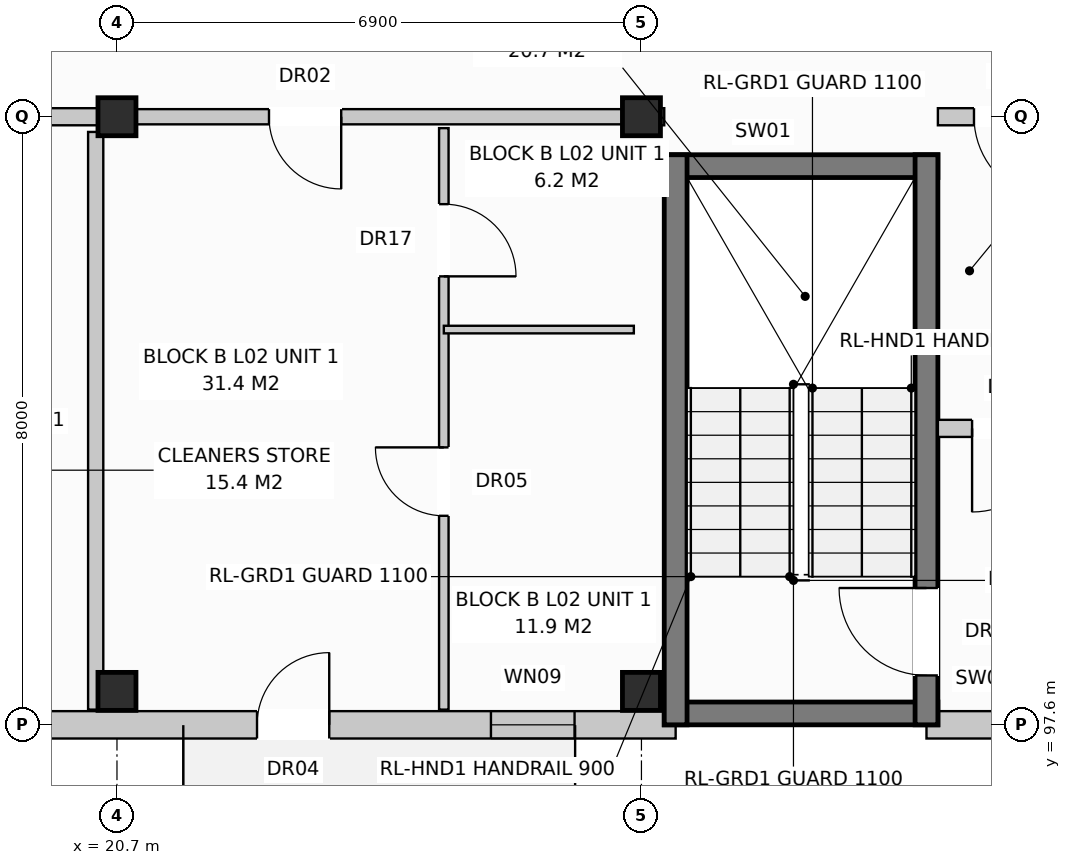
"""IFC4 building model, lengths in metres.
Left out: names, types, materials, properties, quantities, classifications, styles, units other than length and angle.
Written with IfcOpenShell. Run it as: python <this file> out.ifc"""

import sys

from ifc_helpers import new_model, si_unit, direction, frame, frame_2d, origin, origin_with_axes, origin_2d, place, context, subcontext, project, spatial, rectangle, extrude, element, fill, save


model = new_model("IFC4")
c1 = context("Model", 3, precision=1e-05, world=origin(), true_north=direction((0.0, 1.0)))
c2 = subcontext(c1, "Body", "Model", "MODEL_VIEW")
j1 = project(units=[si_unit("LENGTHUNIT", "METRE"), si_unit("PLANEANGLEUNIT", "RADIAN")], contexts=[c1])
p1 = place(None, origin())
s1 = spatial("IfcSite", under=j1, at=p1, CompositionType="ELEMENT")
p2 = place(p1, origin())
s2 = spatial("IfcBuilding", under=s1, at=p2, CompositionType="ELEMENT")
p3 = place(p2, frame((0.0, 0.0, 8.0)))
s3 = spatial("IfcBuildingStorey", under=s2, at=p3, CompositionType="ELEMENT", Elevation=8.0)
for number, where, z_axis, x_axis in (
    (1, (20.7, 98.04, 0.0), (0.0, 0.0, 1.0), (1.0, 0.0, 0.0)),
    (2, (20.7, 105.6, 0.0), (0.0, 0.0, 1.0), (1.0, 0.0, 0.0)),
    (3, (27.6, 98.04, 0.0), (0.0, 0.0, 1.0), (1.0, 0.0, 0.0)),
    (4, (27.6, 105.6, 0.0), (0.0, 0.0, 1.0), (1.0, 0.0, 0.0)),
):
    element("IfcColumn", number, at=place(p3, frame(where, z_axis=z_axis, x_axis=x_axis)), inside=s3, PredefinedType="COLUMN", context=c2, shape_type="SweptSolid", body=[
        extrude(rectangle(XDim=0.5, YDim=0.5, at=origin_2d()), origin(), (0.0, 0.0, 1.0), 3.2),
    ])
p4 = place(p3, frame((10.65, 97.6, 0.0), z_axis=(0.0, 0.0, 1.0), x_axis=(1.0, 0.0, 0.0)))
e5 = element("IfcWall", 5, at=p4, inside=s3, PredefinedType="STANDARD", context=c2, shape_type="SweptSolid", body=[
    extrude(rectangle(XDim=17.4, YDim=0.36, at=frame_2d((8.7, 0.0))), origin(), (0.0, 0.0, 1.0), 2.94),
])
p5 = place(p4, frame((11.893, 0.0, 0.0)))
e6 = element("IfcOpeningElement", 6, at=p5, cuts=e5, PredefinedType="OPENING", context=c2, shape_type="SweptSolid", body=[
    extrude(rectangle(XDim=0.95, YDim=2.1, at=frame_2d((0.475, 1.05))), frame((0.0, 0.192, 0.0), z_axis=(0.0, -1.0, 0.0), x_axis=(1.0, 0.0, 0.0)), (0.0, 0.0, 1.0), 0.384),
])
p6 = place(p4, frame((14.97, 0.0, 0.72)))
e7 = element("IfcOpeningElement", 7, at=p6, cuts=e5, PredefinedType="OPENING", context=c2, shape_type="SweptSolid", body=[
    extrude(rectangle(XDim=1.1, YDim=1.5, at=frame_2d((0.55, 0.75))), frame((0.0, 0.192, 0.0), z_axis=(0.0, -1.0, 0.0), x_axis=(1.0, 0.0, 0.0)), (0.0, 0.0, 1.0), 0.384),
])
p7 = place(p3, frame((31.35, 97.6, 0.0), z_axis=(0.0, 0.0, 1.0), x_axis=(1.0, 0.0, 0.0)))
e8 = element("IfcWall", 8, at=p7, inside=s3, PredefinedType="STANDARD", context=c2, shape_type="SweptSolid", body=[
    extrude(rectangle(XDim=23.68, YDim=0.36, at=frame_2d((11.84, 0.0))), origin(), (0.0, 0.0, 1.0), 2.94),
])
p8 = place(p7, frame((15.32, 0.0, 0.0)))
e9 = element("IfcOpeningElement", 9, at=p8, cuts=e8, PredefinedType="OPENING", context=c2, shape_type="SweptSolid", body=[
    extrude(rectangle(XDim=0.95, YDim=2.1, at=frame_2d((0.475, 1.05))), frame((0.0, 0.192, 0.0), z_axis=(0.0, -1.0, 0.0), x_axis=(1.0, 0.0, 0.0)), (0.0, 0.0, 1.0), 0.384),
])
p9 = place(p7, frame((11.67, 0.0, 0.72)))
e10 = element("IfcOpeningElement", 10, at=p9, cuts=e8, PredefinedType="OPENING", context=c2, shape_type="SweptSolid", body=[
    extrude(rectangle(XDim=1.1, YDim=1.5, at=frame_2d((0.55, 0.75))), frame((0.0, 0.192, 0.0), z_axis=(0.0, -1.0, 0.0), x_axis=(1.0, 0.0, 0.0)), (0.0, 0.0, 1.0), 0.384),
])
p10 = place(p7, frame((17.52, 0.0, 0.9)))
e11 = element("IfcOpeningElement", 11, at=p10, cuts=e8, PredefinedType="OPENING", context=c2, shape_type="SweptSolid", body=[
    extrude(rectangle(XDim=0.95, YDim=1.55, at=frame_2d((0.475, 0.775))), frame((0.0, 0.192, 0.0), z_axis=(0.0, -1.0, 0.0), x_axis=(1.0, 0.0, 0.0)), (0.0, 0.0, 1.0), 0.384),
])
p11 = place(p7, frame((20.67, 0.0, 0.72)))
e12 = element("IfcOpeningElement", 12, at=p11, cuts=e8, PredefinedType="OPENING", context=c2, shape_type="SweptSolid", body=[
    extrude(rectangle(XDim=1.1, YDim=1.5, at=frame_2d((0.55, 0.75))), frame((0.0, 0.192, 0.0), z_axis=(0.0, -1.0, 0.0), x_axis=(1.0, 0.0, 0.0)), (0.0, 0.0, 1.0), 0.384),
])
p12 = place(p3, frame((20.42, 97.8, 0.0), z_axis=(0.0, 0.0, 1.0), x_axis=(0.0, 1.0, 0.0)))
e13 = element("IfcWall", 13, at=p12, inside=s3, PredefinedType="PARTITIONING", context=c2, shape_type="SweptSolid", body=[
    extrude(rectangle(XDim=7.6, YDim=0.2, at=frame_2d((3.8, 0.0))), origin(), (0.0, 0.0, 1.0), 2.94),
])
p13 = place(p3, frame((10.8, 105.6, 0.0), z_axis=(0.0, 0.0, 1.0), x_axis=(1.0, 0.0, 0.0)))
e14 = element("IfcWall", 14, at=p13, inside=s3, PredefinedType="PARTITIONING", context=c2, shape_type="SweptSolid", body=[
    extrude(rectangle(XDim=9.9, YDim=0.225, at=frame_2d((4.95, 0.0))), origin(), (0.0, 0.0, 1.0), 2.38),
])
p14 = place(p13, frame((0.475, 0.0, 0.0)))
e15 = element("IfcOpeningElement", 15, at=p14, cuts=e14, PredefinedType="OPENING", context=c2, shape_type="SweptSolid", body=[
    extrude(rectangle(XDim=1.1, YDim=2.15, at=frame_2d((0.55, 1.075))), frame((0.0, 0.125, 0.0), z_axis=(0.0, -1.0, 0.0), x_axis=(1.0, 0.0, 0.0)), (0.0, 0.0, 1.0), 0.249),
])
p15 = place(p13, frame((5.75, 0.0, 0.0)))
e16 = element("IfcOpeningElement", 16, at=p15, cuts=e14, PredefinedType="OPENING", context=c2, shape_type="SweptSolid", body=[
    extrude(rectangle(XDim=0.9, YDim=2.1, at=frame_2d((0.45, 1.05))), frame((0.0, 0.125, 0.0), z_axis=(0.0, -1.0, 0.0), x_axis=(1.0, 0.0, 0.0)), (0.0, 0.0, 1.0), 0.249),
])
p16 = place(p13, frame((7.8, 0.0, 0.0)))
e17 = element("IfcOpeningElement", 17, at=p16, cuts=e14, PredefinedType="OPENING", context=c2, shape_type="SweptSolid", body=[
    extrude(rectangle(XDim=0.95, YDim=2.15, at=frame_2d((0.475, 1.075))), frame((0.0, 0.125, 0.0), z_axis=(0.0, -1.0, 0.0), x_axis=(1.0, 0.0, 0.0)), (0.0, 0.0, 1.0), 0.249),
])
for number, where, z_axis, x_axis in (
    (18, (27.9, 97.75, 0.0), (0.0, 0.0, 1.0), (1.0, 0.0, 0.0)),
    (19, (27.9, 104.95, 0.0), (0.0, 0.0, 1.0), (1.0, 0.0, 0.0)),
):
    element("IfcWall", number, at=place(p3, frame(where, z_axis=z_axis, x_axis=x_axis)), inside=s3, PredefinedType="SHEAR", context=c2, shape_type="SweptSolid", body=[
        extrude(rectangle(XDim=3.6, YDim=0.3, at=frame_2d((1.8, 0.0))), origin(), (0.0, 0.0, 1.0), 2.94),
    ])
p17 = place(p3, frame((28.05, 97.6, 0.0), z_axis=(0.0, 0.0, 1.0), x_axis=(0.0, 1.0, 0.0)))
e20 = element("IfcWall", 20, at=p17, inside=s3, PredefinedType="SHEAR", context=c2, shape_type="SweptSolid", body=[
    extrude(rectangle(XDim=7.5, YDim=0.3, at=frame_2d((3.75, 0.0))), origin(), (0.0, 0.0, 1.0), 2.94),
])
p18 = place(p3, frame((31.35, 97.6, 0.0), z_axis=(0.0, 0.0, 1.0), x_axis=(0.0, 1.0, 0.0)))
e21 = element("IfcWall", 21, at=p18, inside=s3, PredefinedType="SHEAR", context=c2, shape_type="SweptSolid", body=[
    extrude(rectangle(XDim=7.5, YDim=0.3, at=frame_2d((3.75, 0.0))), origin(), (0.0, 0.0, 1.0), 2.94),
])
p19 = place(p18, frame((0.65, 0.0, 0.0)))
e22 = element("IfcOpeningElement", 22, at=p19, cuts=e21, PredefinedType="OPENING", context=c2, shape_type="SweptSolid", body=[
    extrude(rectangle(XDim=1.15, YDim=2.15, at=frame_2d((0.575, 1.075))), frame((0.0, 0.162, 0.0), z_axis=(0.0, -1.0, 0.0), x_axis=(1.0, 0.0, 0.0)), (0.0, 0.0, 1.0), 0.324),
])
p20 = place(p3, frame((31.5, 101.5, 0.0), z_axis=(0.0, 0.0, 1.0), x_axis=(1.0, 0.0, 0.0)))
e23 = element("IfcWall", 23, at=p20, inside=s3, PredefinedType="PARTITIONING", context=c2, shape_type="SweptSolid", body=[
    extrude(rectangle(XDim=2.2, YDim=0.225, at=frame_2d((1.1, 0.0))), origin(), (0.0, 0.0, 1.0), 2.94),
])
p21 = place(p20, frame((0.45, 0.0, 0.0)))
e24 = element("IfcOpeningElement", 24, at=p21, cuts=e23, PredefinedType="OPENING", context=c2, shape_type="SweptSolid", body=[
    extrude(rectangle(XDim=1.1, YDim=2.15, at=frame_2d((0.55, 1.075))), frame((0.0, 0.125, 0.0), z_axis=(0.0, -1.0, 0.0), x_axis=(1.0, 0.0, 0.0)), (0.0, 0.0, 1.0), 0.249),
])
p22 = place(p3, frame((27.6, 105.6, 0.0), z_axis=(0.0, 0.0, 1.0), x_axis=(1.0, 0.0, 0.0)))
e25 = element("IfcWall", 25, at=p22, inside=s3, PredefinedType="PARTITIONING", context=c2, shape_type="SweptSolid", body=[
    extrude(rectangle(XDim=0.3, YDim=0.225, at=frame_2d((0.15, 0.0))), origin(), (0.0, 0.0, 1.0), 2.94),
])
p23 = place(p3, frame((31.5, 105.6, 0.0), z_axis=(0.0, 0.0, 1.0), x_axis=(1.0, 0.0, 0.0)))
e26 = element("IfcWall", 26, at=p23, inside=s3, PredefinedType="PARTITIONING", context=c2, shape_type="SweptSolid", body=[
    extrude(rectangle(XDim=9.9, YDim=0.225, at=frame_2d((4.95, 0.0))), origin(), (0.0, 0.0, 1.0), 2.38),
])
p24 = place(p23, frame((0.475, 0.0, 0.0)))
e27 = element("IfcOpeningElement", 27, at=p24, cuts=e26, PredefinedType="OPENING", context=c2, shape_type="SweptSolid", body=[
    extrude(rectangle(XDim=1.1, YDim=2.15, at=frame_2d((0.55, 1.075))), frame((0.0, 0.125, 0.0), z_axis=(0.0, -1.0, 0.0), x_axis=(1.0, 0.0, 0.0)), (0.0, 0.0, 1.0), 0.249),
])
p25 = place(p23, frame((5.75, 0.0, 0.0)))
e28 = element("IfcOpeningElement", 28, at=p25, cuts=e26, PredefinedType="OPENING", context=c2, shape_type="SweptSolid", body=[
    extrude(rectangle(XDim=0.9, YDim=2.1, at=frame_2d((0.45, 1.05))), frame((0.0, 0.125, 0.0), z_axis=(0.0, -1.0, 0.0), x_axis=(1.0, 0.0, 0.0)), (0.0, 0.0, 1.0), 0.249),
])
p26 = place(p23, frame((7.8, 0.0, 0.0)))
e29 = element("IfcOpeningElement", 29, at=p26, cuts=e26, PredefinedType="OPENING", context=c2, shape_type="SweptSolid", body=[
    extrude(rectangle(XDim=0.95, YDim=2.15, at=frame_2d((0.475, 1.075))), frame((0.0, 0.125, 0.0), z_axis=(0.0, -1.0, 0.0), x_axis=(1.0, 0.0, 0.0)), (0.0, 0.0, 1.0), 0.249),
])
p27 = place(p3, frame((20.7, 105.6, 0.0), z_axis=(0.0, 0.0, 1.0), x_axis=(1.0, 0.0, 0.0)))
e30 = element("IfcWall", 30, at=p27, inside=s3, PredefinedType="PARTITIONING", context=c2, shape_type="SweptSolid", body=[
    extrude(rectangle(XDim=6.9, YDim=0.2, at=frame_2d((3.45, 0.0))), origin(), (0.0, 0.0, 1.0), 2.38),
])
p28 = place(p27, frame((2.0, 0.0, 0.0)))
e31 = element("IfcOpeningElement", 31, at=p28, cuts=e30, PredefinedType="OPENING", context=c2, shape_type="SweptSolid", body=[
    extrude(rectangle(XDim=0.95, YDim=2.15, at=frame_2d((0.475, 1.075))), frame((0.0, 0.112, 0.0), z_axis=(0.0, -1.0, 0.0), x_axis=(1.0, 0.0, 0.0)), (0.0, 0.0, 1.0), 0.224),
])
p29 = place(p3, frame((25.0, 105.45, 0.0), z_axis=(0.0, 0.0, 1.0), x_axis=(0.0, -1.0, 0.0)))
e32 = element("IfcWall", 32, at=p29, inside=s3, PredefinedType="PARTITIONING", context=c2, shape_type="SweptSolid", body=[
    extrude(rectangle(XDim=7.65, YDim=0.125, at=frame_2d((3.825, 0.0))), origin(), (0.0, 0.0, 1.0), 2.94),
])
p30 = place(p29, frame((1.0, 0.0, 0.0)))
e33 = element("IfcOpeningElement", 33, at=p30, cuts=e32, PredefinedType="OPENING", context=c2, shape_type="SweptSolid", body=[
    extrude(rectangle(XDim=0.95, YDim=2.1, at=frame_2d((0.475, 1.05))), frame((0.0, 0.074, 0.0), z_axis=(0.0, -1.0, 0.0), x_axis=(1.0, 0.0, 0.0)), (0.0, 0.0, 1.0), 0.149),
])
p31 = place(p29, frame((4.2, 0.0, 0.0)))
e34 = element("IfcOpeningElement", 34, at=p31, cuts=e32, PredefinedType="OPENING", context=c2, shape_type="SweptSolid", body=[
    extrude(rectangle(XDim=0.9, YDim=2.1, at=frame_2d((0.45, 1.05))), frame((0.0, 0.074, 0.0), z_axis=(0.0, -1.0, 0.0), x_axis=(1.0, 0.0, 0.0)), (0.0, 0.0, 1.0), 0.149),
])
p32 = place(p3, frame((25.0, 102.8, 0.0), z_axis=(0.0, 0.0, 1.0), x_axis=(1.0, 0.0, 0.0)))
e35 = element("IfcWall", 35, at=p32, inside=s3, PredefinedType="PARTITIONING", context=c2, shape_type="SweptSolid", body=[
    extrude(rectangle(XDim=2.5, YDim=0.1, at=frame_2d((1.25, 0.0))), origin(), (0.0, 0.0, 1.0), 2.94),
])
p33 = place(p5, origin_with_axes())
e36 = element("IfcDoor", 36, at=p33, inside=s3, OperationType="SINGLE_SWING_RIGHT", PredefinedType="DOOR", context=c2, shape_type="SweptSolid", body=[
    extrude(rectangle(XDim=0.95, YDim=2.1, at=frame_2d((0.475, 1.05))), frame((0.0, 0.025, 0.0), z_axis=(0.0, -1.0, 0.0), x_axis=(1.0, 0.0, 0.0)), (0.0, 0.0, 1.0), 0.05),
])
fill(e6, e36)
p34 = place(p6, origin_with_axes())
e37 = element("IfcWindow", 37, at=p34, inside=s3, PartitioningType="SINGLE_PANEL", PredefinedType="WINDOW", context=c2, shape_type="SweptSolid", body=[
    extrude(rectangle(XDim=1.1, YDim=1.5, at=frame_2d((0.55, 0.75))), frame((0.0, 0.03, 0.0), z_axis=(0.0, -1.0, 0.0), x_axis=(1.0, 0.0, 0.0)), (0.0, 0.0, 1.0), 0.06),
])
fill(e7, e37)
p35 = place(p19, origin_with_axes())
e38 = element("IfcDoor", 38, at=p35, inside=s3, OperationType="SINGLE_SWING_RIGHT", PredefinedType="DOOR", context=c2, shape_type="SweptSolid", body=[
    extrude(rectangle(XDim=1.15, YDim=2.15, at=frame_2d((0.575, 1.075))), frame((0.0, 0.025, 0.0), z_axis=(0.0, -1.0, 0.0), x_axis=(1.0, 0.0, 0.0)), (0.0, 0.0, 1.0), 0.05),
])
fill(e22, e38)
p36 = place(p21, frame((1.1, 0.0, 0.0), z_axis=(0.0, 0.0, 1.0), x_axis=(-1.0, 0.0, 0.0)))
e39 = element("IfcDoor", 39, at=p36, inside=s3, OperationType="SINGLE_SWING_LEFT", PredefinedType="DOOR", context=c2, shape_type="SweptSolid", body=[
    extrude(rectangle(XDim=1.1, YDim=2.15, at=frame_2d((0.55, 1.075))), frame((0.0, 0.025, 0.0), z_axis=(0.0, -1.0, 0.0), x_axis=(1.0, 0.0, 0.0)), (0.0, 0.0, 1.0), 0.05),
])
fill(e24, e39)
p37 = place(p24, frame((1.1, 0.0, 0.0), z_axis=(0.0, 0.0, 1.0), x_axis=(-1.0, 0.0, 0.0)))
e40 = element("IfcDoor", 40, at=p37, inside=s3, OperationType="SINGLE_SWING_RIGHT", PredefinedType="DOOR", context=c2, shape_type="SweptSolid", body=[
    extrude(rectangle(XDim=1.1, YDim=2.15, at=frame_2d((0.55, 1.075))), frame((0.0, 0.025, 0.0), z_axis=(0.0, -1.0, 0.0), x_axis=(1.0, 0.0, 0.0)), (0.0, 0.0, 1.0), 0.05),
])
fill(e27, e40)
p38 = place(p28, frame((0.95, 0.0, 0.0), z_axis=(0.0, 0.0, 1.0), x_axis=(-1.0, 0.0, 0.0)))
e41 = element("IfcDoor", 41, at=p38, inside=s3, OperationType="SINGLE_SWING_RIGHT", PredefinedType="DOOR", context=c2, shape_type="SweptSolid", body=[
    extrude(rectangle(XDim=0.95, YDim=2.15, at=frame_2d((0.475, 1.075))), frame((0.0, 0.025, 0.0), z_axis=(0.0, -1.0, 0.0), x_axis=(1.0, 0.0, 0.0)), (0.0, 0.0, 1.0), 0.05),
])
fill(e31, e41)
p39 = place(p30, origin_with_axes())
e42 = element("IfcDoor", 42, at=p39, inside=s3, OperationType="SINGLE_SWING_RIGHT", PredefinedType="DOOR", context=c2, shape_type="SweptSolid", body=[
    extrude(rectangle(XDim=0.95, YDim=2.1, at=frame_2d((0.475, 1.05))), frame((0.0, 0.025, 0.0), z_axis=(0.0, -1.0, 0.0), x_axis=(1.0, 0.0, 0.0)), (0.0, 0.0, 1.0), 0.05),
])
fill(e33, e42)
p40 = place(p31, frame((0.9, 0.0, 0.0), z_axis=(0.0, 0.0, 1.0), x_axis=(-1.0, 0.0, 0.0)))
e43 = element("IfcDoor", 43, at=p40, inside=s3, OperationType="SINGLE_SWING_LEFT", PredefinedType="DOOR", context=c2, shape_type="SweptSolid", body=[
    extrude(rectangle(XDim=0.9, YDim=2.1, at=frame_2d((0.45, 1.05))), frame((0.0, 0.025, 0.0), z_axis=(0.0, -1.0, 0.0), x_axis=(1.0, 0.0, 0.0)), (0.0, 0.0, 1.0), 0.05),
])
fill(e34, e43)
save(model, sys.argv[1])
